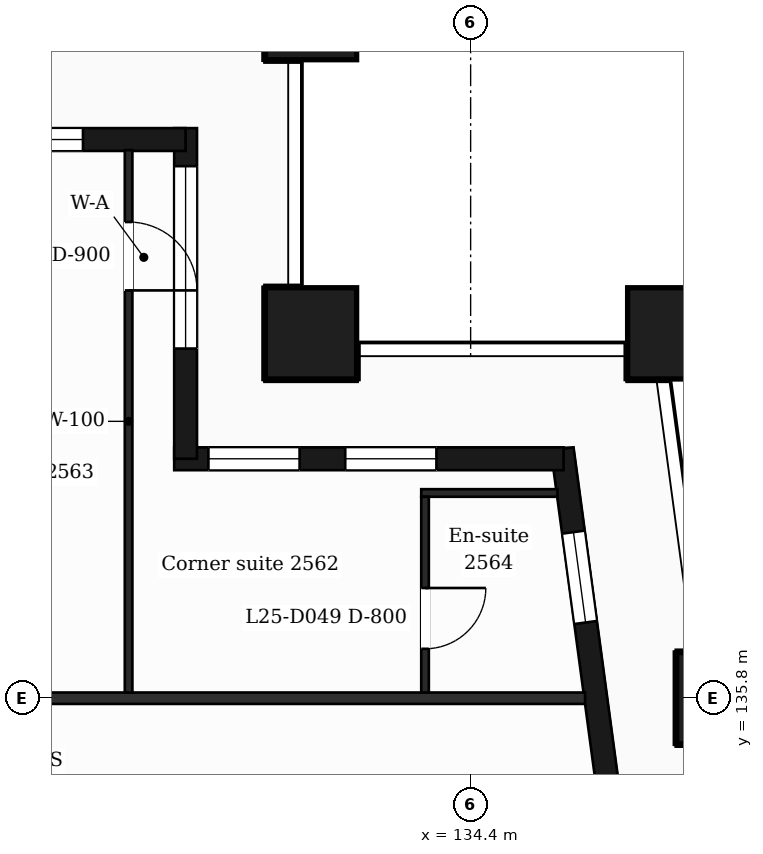
"""IFC4 building model, lengths in metres.
Left out: names, types, materials, properties, quantities, classifications, styles, units other than length and angle.
Written with IfcOpenShell. Run it as: python <this file> out.ifc"""

import sys

from ifc_helpers import new_model, si_unit, direction, frame, frame_2d, origin, origin_2d, place, context, subcontext, project, spatial, rectangle, extrude, element, fill, save


model = new_model("IFC4")
c1 = context("Model", 3, precision=1e-05, world=origin(), true_north=direction((0.0, 1.0)))
c2 = subcontext(c1, "Body", "Model", "MODEL_VIEW")
j1 = project(units=[si_unit("LENGTHUNIT", "METRE"), si_unit("PLANEANGLEUNIT", "RADIAN")], contexts=[c1])
p1 = place(None, origin())
s1 = spatial("IfcSite", under=j1, at=p1, CompositionType="ELEMENT")
p2 = place(p1, origin())
s2 = spatial("IfcBuilding", under=s1, at=p2, CompositionType="ELEMENT")
p3 = place(p2, frame((0.0, 0.0, 109.5)))
s3 = spatial("IfcBuildingStorey", under=s2, at=p3, CompositionType="ELEMENT", Elevation=109.5)
for number, where, z_axis, x_axis in (
    (1, (132.3, 140.6, 0.0), (0.0, 0.0, 1.0), (1.0, 0.0, 0.0)),
    (2, (137.065, 140.6, 0.0), (0.0, 0.0, 1.0), (1.0, 0.0, 0.0)),
    (3, (137.711, 135.8, 0.0), (0.0, 0.0, 1.0), (1.0, 0.0, 0.0)),
    (4, (132.3, 144.8, 0.0), (0.0, 0.0, 1.0), (1.0, 0.0, 0.0)),
):
    element("IfcColumn", number, at=place(p3, frame(where, z_axis=z_axis, x_axis=x_axis)), inside=s3, PredefinedType="COLUMN", context=c2, shape_type="SweptSolid", body=[
        extrude(rectangle(XDim=1.2, YDim=1.2, at=origin_2d()), origin(), (0.0, 0.0, 1.0), 3.7),
    ])
p4 = place(p3, frame((136.504, 132.4, 0.0), z_axis=(0.0, 0.0, 1.0), x_axis=(-0.133399697462, 0.99106231929, 0.0)))
e5 = element("IfcWall", 5, at=p4, inside=s3, PredefinedType="SOLIDWALL", context=c2, shape_type="SweptSolid", body=[
    extrude(rectangle(XDim=6.74, YDim=0.3, at=frame_2d((3.37, 0.0))), origin(), (0.0, 0.0, 1.0), 3.38),
])
p5 = place(p4, frame((1.115, 0.0, 0.0)))
e6 = element("IfcOpeningElement", 6, at=p5, cuts=e5, PredefinedType="OPENING", context=c2, shape_type="SweptSolid", body=[
    extrude(rectangle(XDim=1.2, YDim=2.4, at=frame_2d((0.6, 1.2))), frame((0.0, 0.16, 0.0), z_axis=(0.0, -1.0, 0.0), x_axis=(1.0, 0.0, 0.0)), (0.0, 0.0, 1.0), 0.32),
])
p6 = place(p4, frame((4.436, 0.0, 0.9)))
e7 = element("IfcOpeningElement", 7, at=p6, cuts=e5, PredefinedType="OPENING", context=c2, shape_type="SweptSolid", body=[
    extrude(rectangle(XDim=1.2, YDim=2.1, at=frame_2d((0.6, 1.05))), frame((0.0, 0.16, 0.0), z_axis=(0.0, -1.0, 0.0), x_axis=(1.0, 0.0, 0.0)), (0.0, 0.0, 1.0), 0.32),
])
p7 = place(p3, frame((135.623, 138.95, 0.0), z_axis=(0.0, 0.0, 1.0), x_axis=(-1.0, 0.0, 0.0)))
e8 = element("IfcWall", 8, at=p7, inside=s3, PredefinedType="SOLIDWALL", context=c2, shape_type="SweptSolid", body=[
    extrude(rectangle(XDim=5.123, YDim=0.3, at=frame_2d((2.561, 0.0))), origin(), (0.0, 0.0, 1.0), 3.38),
])
p8 = place(p7, frame((1.673, 0.0, 0.9)))
e9 = element("IfcOpeningElement", 9, at=p8, cuts=e8, PredefinedType="OPENING", context=c2, shape_type="SweptSolid", body=[
    extrude(rectangle(XDim=1.2, YDim=2.1, at=frame_2d((0.6, 1.05))), frame((0.0, 0.16, 0.0), z_axis=(0.0, -1.0, 0.0), x_axis=(1.0, 0.0, 0.0)), (0.0, 0.0, 1.0), 0.32),
])
p9 = place(p7, frame((3.473, 0.0, 0.9)))
e10 = element("IfcOpeningElement", 10, at=p9, cuts=e8, PredefinedType="OPENING", context=c2, shape_type="SweptSolid", body=[
    extrude(rectangle(XDim=1.2, YDim=2.1, at=frame_2d((0.6, 1.05))), frame((0.0, 0.16, 0.0), z_axis=(0.0, -1.0, 0.0), x_axis=(1.0, 0.0, 0.0)), (0.0, 0.0, 1.0), 0.32),
])
p10 = place(p3, frame((130.65, 138.95, 0.0), z_axis=(0.0, 0.0, 1.0), x_axis=(0.0, 1.0, 0.0)))
e11 = element("IfcWall", 11, at=p10, inside=s3, PredefinedType="SOLIDWALL", context=c2, shape_type="SweptSolid", body=[
    extrude(rectangle(XDim=4.35, YDim=0.3, at=frame_2d((2.175, 0.0))), origin(), (0.0, 0.0, 1.0), 3.38),
])
p11 = place(p10, frame((1.45, 0.0, 0.9)))
e12 = element("IfcOpeningElement", 12, at=p11, cuts=e11, PredefinedType="OPENING", context=c2, shape_type="SweptSolid", body=[
    extrude(rectangle(XDim=2.4, YDim=2.1, at=frame_2d((1.2, 1.05))), frame((0.0, 0.16, 0.0), z_axis=(0.0, -1.0, 0.0), x_axis=(1.0, 0.0, 0.0)), (0.0, 0.0, 1.0), 0.32),
])
p12 = place(p3, frame((130.65, 143.15, 0.0), z_axis=(0.0, 0.0, 1.0), x_axis=(-1.0, 0.0, 0.0)))
e13 = element("IfcWall", 13, at=p12, inside=s3, PredefinedType="SOLIDWALL", context=c2, shape_type="SweptSolid", body=[
    extrude(rectangle(XDim=14.25, YDim=0.3, at=frame_2d((7.125, 0.0))), origin(), (0.0, 0.0, 1.0), 3.38),
])
p13 = place(p12, frame((1.35, 0.0, 0.9)))
e14 = element("IfcOpeningElement", 14, at=p13, cuts=e13, PredefinedType="OPENING", context=c2, shape_type="SweptSolid", body=[
    extrude(rectangle(XDim=2.4, YDim=2.1, at=frame_2d((1.2, 1.05))), frame((0.0, 0.16, 0.0), z_axis=(0.0, -1.0, 0.0), x_axis=(1.0, 0.0, 0.0)), (0.0, 0.0, 1.0), 0.32),
])
p14 = place(p12, frame((6.15, 0.0, 0.0)))
e15 = element("IfcOpeningElement", 15, at=p14, cuts=e13, PredefinedType="OPENING", context=c2, shape_type="SweptSolid", body=[
    extrude(rectangle(XDim=1.2, YDim=2.4, at=frame_2d((0.6, 1.2))), frame((0.0, 0.16, 0.0), z_axis=(0.0, -1.0, 0.0), x_axis=(1.0, 0.0, 0.0)), (0.0, 0.0, 1.0), 0.32),
])
p15 = place(p12, frame((10.35, 0.0, 0.9)))
e16 = element("IfcOpeningElement", 16, at=p15, cuts=e13, PredefinedType="OPENING", context=c2, shape_type="SweptSolid", body=[
    extrude(rectangle(XDim=1.2, YDim=2.1, at=frame_2d((0.6, 1.05))), frame((0.0, 0.16, 0.0), z_axis=(0.0, -1.0, 0.0), x_axis=(1.0, 0.0, 0.0)), (0.0, 0.0, 1.0), 0.32),
])
p16 = place(p3, frame((90.895, 135.8, 0.0), z_axis=(0.0, 0.0, 1.0), x_axis=(1.0, 0.0, 0.0)))
e17 = element("IfcWall", 17, at=p16, inside=s3, PredefinedType="PARTITIONING", context=c2, shape_type="SweptSolid", body=[
    extrude(rectangle(XDim=45.011, YDim=0.15, at=frame_2d((22.505, 0.0))), origin(), (0.0, 0.0, 1.0), 3.38),
])
p17 = place(p16, frame((6.906, 0.0, 0.0)))
e18 = element("IfcOpeningElement", 18, at=p17, cuts=e17, PredefinedType="OPENING", context=c2, shape_type="SweptSolid", body=[
    extrude(rectangle(XDim=1.0, YDim=2.1, at=frame_2d((0.5, 1.05))), frame((0.0, 0.085, 0.0), z_axis=(0.0, -1.0, 0.0), x_axis=(1.0, 0.0, 0.0)), (0.0, 0.0, 1.0), 0.17),
])
p18 = place(p16, frame((12.13, 0.0, 0.0)))
e19 = element("IfcOpeningElement", 19, at=p18, cuts=e17, PredefinedType="OPENING", context=c2, shape_type="SweptSolid", body=[
    extrude(rectangle(XDim=1.0, YDim=2.1, at=frame_2d((0.5, 1.05))), frame((0.0, 0.085, 0.0), z_axis=(0.0, -1.0, 0.0), x_axis=(1.0, 0.0, 0.0)), (0.0, 0.0, 1.0), 0.17),
])
p19 = place(p16, frame((23.48, 0.0, 0.0)))
e20 = element("IfcOpeningElement", 20, at=p19, cuts=e17, PredefinedType="OPENING", context=c2, shape_type="SweptSolid", body=[
    extrude(rectangle(XDim=1.0, YDim=2.1, at=frame_2d((0.5, 1.05))), frame((0.0, 0.085, 0.0), z_axis=(0.0, -1.0, 0.0), x_axis=(1.0, 0.0, 0.0)), (0.0, 0.0, 1.0), 0.17),
])
p20 = place(p16, frame((27.515, 0.0, 0.0)))
e21 = element("IfcOpeningElement", 21, at=p20, cuts=e17, PredefinedType="OPENING", context=c2, shape_type="SweptSolid", body=[
    extrude(rectangle(XDim=0.95, YDim=2.1, at=frame_2d((0.475, 1.05))), frame((0.0, 0.085, 0.0), z_axis=(0.0, -1.0, 0.0), x_axis=(1.0, 0.0, 0.0)), (0.0, 0.0, 1.0), 0.17),
])
p21 = place(p16, frame((31.18, 0.0, 0.0)))
e22 = element("IfcOpeningElement", 22, at=p21, cuts=e17, PredefinedType="OPENING", context=c2, shape_type="SweptSolid", body=[
    extrude(rectangle(XDim=0.95, YDim=2.1, at=frame_2d((0.475, 1.05))), frame((0.0, 0.085, 0.0), z_axis=(0.0, -1.0, 0.0), x_axis=(1.0, 0.0, 0.0)), (0.0, 0.0, 1.0), 0.17),
])
p22 = place(p16, frame((36.005, 0.0, 0.0)))
e23 = element("IfcOpeningElement", 23, at=p22, cuts=e17, PredefinedType="OPENING", context=c2, shape_type="SweptSolid", body=[
    extrude(rectangle(XDim=1.0, YDim=2.1, at=frame_2d((0.5, 1.05))), frame((0.0, 0.085, 0.0), z_axis=(0.0, -1.0, 0.0), x_axis=(1.0, 0.0, 0.0)), (0.0, 0.0, 1.0), 0.17),
])
p23 = place(p3, frame((133.75, 138.5, 0.0), z_axis=(0.0, 0.0, 1.0), x_axis=(1.0, 0.0, 0.0)))
e24 = element("IfcWall", 24, at=p23, inside=s3, PredefinedType="PARTITIONING", context=c2, shape_type="SweptSolid", body=[
    extrude(rectangle(XDim=1.792, YDim=0.1, at=frame_2d((0.896, 0.0))), origin(), (0.0, 0.0, 1.0), 3.38),
])
p24 = place(p3, frame((129.9, 135.875, 0.0), z_axis=(0.0, 0.0, 1.0), x_axis=(0.0, 1.0, 0.0)))
e25 = element("IfcWall", 25, at=p24, inside=s3, PredefinedType="PARTITIONING", context=c2, shape_type="SweptSolid", body=[
    extrude(rectangle(XDim=7.135, YDim=0.1, at=frame_2d((3.567, 0.0))), origin(), (0.0, 0.0, 1.0), 3.38),
])
p25 = place(p24, frame((5.29, 0.0, 0.0)))
e26 = element("IfcOpeningElement", 26, at=p25, cuts=e25, PredefinedType="OPENING", context=c2, shape_type="SweptSolid", body=[
    extrude(rectangle(XDim=0.9, YDim=2.1, at=frame_2d((0.45, 1.05))), frame((0.0, 0.06, 0.0), z_axis=(0.0, -1.0, 0.0), x_axis=(1.0, 0.0, 0.0)), (0.0, 0.0, 1.0), 0.12),
])
p26 = place(p3, frame((133.8, 135.875, 0.0), z_axis=(0.0, 0.0, 1.0), x_axis=(0.0, 1.0, 0.0)))
e27 = element("IfcWall", 27, at=p26, inside=s3, PredefinedType="PARTITIONING", context=c2, shape_type="SweptSolid", body=[
    extrude(rectangle(XDim=2.575, YDim=0.1, at=frame_2d((1.288, 0.0))), origin(), (0.0, 0.0, 1.0), 3.38),
])
p27 = place(p26, frame((0.575, 0.0, 0.0)))
e28 = element("IfcOpeningElement", 28, at=p27, cuts=e27, PredefinedType="OPENING", context=c2, shape_type="SweptSolid", body=[
    extrude(rectangle(XDim=0.8, YDim=2.1, at=frame_2d((0.4, 1.05))), frame((0.0, 0.06, 0.0), z_axis=(0.0, -1.0, 0.0), x_axis=(1.0, 0.0, 0.0)), (0.0, 0.0, 1.0), 0.12),
])
p28 = place(p6, origin())
e29 = element("IfcWindow", 29, at=p28, inside=s3, PartitioningType="SINGLE_PANEL", PredefinedType="WINDOW", context=c2, shape_type="SweptSolid", body=[
    extrude(rectangle(XDim=1.2, YDim=2.1, at=frame_2d((0.6, 1.05))), frame((0.0, 0.03, 0.0), z_axis=(0.0, -1.0, 0.0), x_axis=(1.0, 0.0, 0.0)), (0.0, 0.0, 1.0), 0.06),
])
fill(e7, e29)
p29 = place(p8, origin())
e30 = element("IfcWindow", 30, at=p29, inside=s3, PartitioningType="SINGLE_PANEL", PredefinedType="WINDOW", context=c2, shape_type="SweptSolid", body=[
    extrude(rectangle(XDim=1.2, YDim=2.1, at=frame_2d((0.6, 1.05))), frame((0.0, 0.03, 0.0), z_axis=(0.0, -1.0, 0.0), x_axis=(1.0, 0.0, 0.0)), (0.0, 0.0, 1.0), 0.06),
])
fill(e9, e30)
p30 = place(p9, origin())
e31 = element("IfcWindow", 31, at=p30, inside=s3, PartitioningType="SINGLE_PANEL", PredefinedType="WINDOW", context=c2, shape_type="SweptSolid", body=[
    extrude(rectangle(XDim=1.2, YDim=2.1, at=frame_2d((0.6, 1.05))), frame((0.0, 0.03, 0.0), z_axis=(0.0, -1.0, 0.0), x_axis=(1.0, 0.0, 0.0)), (0.0, 0.0, 1.0), 0.06),
])
fill(e10, e31)
p31 = place(p11, origin())
e32 = element("IfcWindow", 32, at=p31, inside=s3, PartitioningType="SINGLE_PANEL", PredefinedType="WINDOW", context=c2, shape_type="SweptSolid", body=[
    extrude(rectangle(XDim=2.4, YDim=2.1, at=frame_2d((1.2, 1.05))), frame((0.0, 0.03, 0.0), z_axis=(0.0, -1.0, 0.0), x_axis=(1.0, 0.0, 0.0)), (0.0, 0.0, 1.0), 0.06),
])
fill(e12, e32)
p32 = place(p13, origin())
e33 = element("IfcWindow", 33, at=p32, inside=s3, PartitioningType="SINGLE_PANEL", PredefinedType="WINDOW", context=c2, shape_type="SweptSolid", body=[
    extrude(rectangle(XDim=2.4, YDim=2.1, at=frame_2d((1.2, 1.05))), frame((0.0, 0.03, 0.0), z_axis=(0.0, -1.0, 0.0), x_axis=(1.0, 0.0, 0.0)), (0.0, 0.0, 1.0), 0.06),
])
fill(e14, e33)
p33 = place(p25, origin())
e34 = element("IfcDoor", 34, at=p33, inside=s3, OperationType="SINGLE_SWING_LEFT", PredefinedType="DOOR", context=c2, shape_type="SweptSolid", body=[
    extrude(rectangle(XDim=0.9, YDim=2.1, at=frame_2d((0.45, 1.05))), frame((0.0, 0.025, 0.0), z_axis=(0.0, -1.0, 0.0), x_axis=(1.0, 0.0, 0.0)), (0.0, 0.0, 1.0), 0.05),
])
fill(e26, e34)
p34 = place(p27, origin())
e35 = element("IfcDoor", 35, at=p34, inside=s3, OperationType="SINGLE_SWING_RIGHT", PredefinedType="DOOR", context=c2, shape_type="SweptSolid", body=[
    extrude(rectangle(XDim=0.8, YDim=2.1, at=frame_2d((0.4, 1.05))), frame((0.0, 0.025, 0.0), z_axis=(0.0, -1.0, 0.0), x_axis=(1.0, 0.0, 0.0)), (0.0, 0.0, 1.0), 0.05),
])
fill(e28, e35)
save(model, sys.argv[1])
